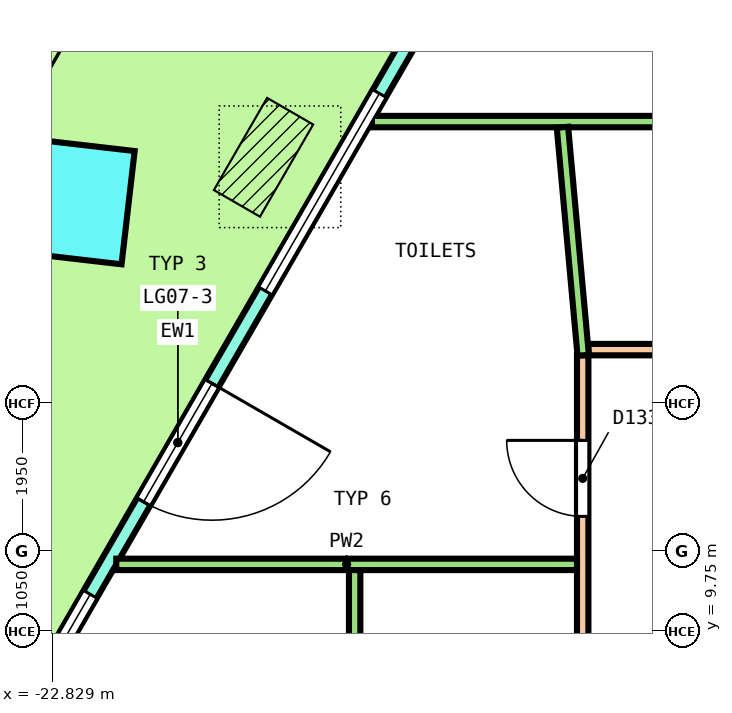
"""IFC4 building model, lengths in metres.
Left out: names, types, materials, properties, quantities, classifications, styles, units other than length and angle.
Written with IfcOpenShell. Run it as: python <this file> out.ifc"""

import sys

from ifc_helpers import new_model, si_unit, direction, frame, frame_2d, origin, origin_2d, place, context, subcontext, project, spatial, polyline, rectangle, outline, extrude, element, fill, save


model = new_model("IFC4")
c1 = context("Model", 3, precision=1e-05, world=origin(), true_north=direction((0.0, 1.0)))
c2 = subcontext(c1, "Body", "Model", "MODEL_VIEW")
j1 = project(units=[si_unit("LENGTHUNIT", "METRE"), si_unit("PLANEANGLEUNIT", "RADIAN")], contexts=[c1])
p1 = place(None, origin())
s1 = spatial("IfcSite", under=j1, at=p1, CompositionType="ELEMENT")
p2 = place(p1, origin())
s2 = spatial("IfcBuilding", under=s1, at=p2, CompositionType="ELEMENT")
p3 = place(p2, frame((0.0, 0.0, 32.2)))
s3 = spatial("IfcBuildingStorey", under=s2, at=p3, CompositionType="ELEMENT", Elevation=32.2)
p4 = place(p3, frame((-22.576, 15.404, 0.0), z_axis=(-0.029040860623, 0.012532155622, 0.999499661576), x_axis=(-0.499041572146, -0.866570424295, -0.003634419767)))
e1 = element("IfcColumn", 1, at=p4, inside=s3, PredefinedType="COLUMN", context=c2, shape_type="SweptSolid", body=[
    extrude(rectangle(XDim=1.5, YDim=1.5, at=origin_2d()), origin(), (0.0, 0.0, 1.0), 4.052),
])
p5 = place(p3, frame((-16.422, 20.463, 0.0), z_axis=(0.0, 0.0, 1.0), x_axis=(-0.500001707189, -0.866024418136, 0.0)))
e2 = element("IfcWall", 2, at=p5, inside=s3, PredefinedType="SOLIDWALL", context=c2, shape_type="SweptSolid", body=[
    extrude(outline(polyline([(-0.027, -0.1), (0.977, -0.1), (1.981, -0.1), (2.985, -0.1), (3.989, -0.1), (4.993, -0.1), (5.997, -0.1), (7.0, -0.1), (8.004, -0.1), (9.008, -0.1), (10.012, -0.1), (11.016, -0.1), (12.02, -0.1), (13.024, -0.1), (14.028, -0.1), (15.032, -0.1), (16.036, -0.1), (17.04, -0.1), (18.043, -0.1), (19.047, -0.1), (18.994, 0.1), (17.995, 0.1), (16.997, 0.1), (15.999, 0.1), (15.001, 0.1), (14.002, 0.1), (13.004, 0.1), (12.006, 0.1), (11.008, 0.1), (10.009, 0.1), (9.011, 0.1), (8.013, 0.1), (7.015, 0.1), (6.016, 0.1), (5.018, 0.1), (4.02, 0.1), (3.022, 0.1), (2.023, 0.1), (1.025, 0.1), (0.027, 0.1), (-0.027, -0.1)])), origin(), (0.0, 0.0, 1.0), 4.1),
])
p6 = place(p5, frame((0.402, 0.0, 0.1)))
e3 = element("IfcOpeningElement", 3, at=p6, cuts=e2, PredefinedType="OPENING", context=c2, shape_type="SweptSolid", body=[
    extrude(rectangle(XDim=3.0, YDim=2.9, at=frame_2d((1.5, 1.45))), frame((0.0, 0.11, 0.0), z_axis=(0.0, -1.0, 0.0), x_axis=(1.0, 0.0, 0.0)), (0.0, 0.0, 1.0), 0.22),
])
p7 = place(p5, frame((4.206, 0.0, 0.1)))
e4 = element("IfcOpeningElement", 4, at=p7, cuts=e2, PredefinedType="OPENING", context=c2, shape_type="SweptSolid", body=[
    extrude(rectangle(XDim=3.0, YDim=2.9, at=frame_2d((1.5, 1.45))), frame((0.0, 0.11, 0.0), z_axis=(0.0, -1.0, 0.0), x_axis=(1.0, 0.0, 0.0)), (0.0, 0.0, 1.0), 0.22),
])
p8 = place(p5, frame((8.61, 0.0, 0.0)))
e5 = element("IfcOpeningElement", 5, at=p8, cuts=e2, PredefinedType="OPENING", context=c2, shape_type="SweptSolid", body=[
    extrude(rectangle(XDim=1.8, YDim=2.4, at=frame_2d((0.9, 1.2))), frame((0.0, 0.11, 0.0), z_axis=(0.0, -1.0, 0.0), x_axis=(1.0, 0.0, 0.0)), (0.0, 0.0, 1.0), 0.22),
])
p9 = place(p5, frame((8.61, 0.0, 2.55)))
e6 = element("IfcOpeningElement", 6, at=p9, cuts=e2, PredefinedType="OPENING", context=c2, shape_type="SweptSolid", body=[
    extrude(rectangle(XDim=1.8, YDim=0.45, at=frame_2d((0.9, 0.225))), frame((0.0, 0.11, 0.0), z_axis=(0.0, -1.0, 0.0), x_axis=(1.0, 0.0, 0.0)), (0.0, 0.0, 1.0), 0.22),
])
p10 = place(p5, frame((11.814, 0.0, 0.1)))
e7 = element("IfcOpeningElement", 7, at=p10, cuts=e2, PredefinedType="OPENING", context=c2, shape_type="SweptSolid", body=[
    extrude(rectangle(XDim=3.0, YDim=2.9, at=frame_2d((1.5, 1.45))), frame((0.0, 0.11, 0.0), z_axis=(0.0, -1.0, 0.0), x_axis=(1.0, 0.0, 0.0)), (0.0, 0.0, 1.0), 0.22),
])
p11 = place(p5, frame((15.618, 0.0, 0.1)))
e8 = element("IfcOpeningElement", 8, at=p11, cuts=e2, PredefinedType="OPENING", context=c2, shape_type="SweptSolid", body=[
    extrude(rectangle(XDim=3.0, YDim=2.9, at=frame_2d((1.5, 1.45))), frame((0.0, 0.11, 0.0), z_axis=(0.0, -1.0, 0.0), x_axis=(1.0, 0.0, 0.0)), (0.0, 0.0, 1.0), 0.22),
])
p12 = place(p3, frame((-15.775, 13.45, 0.0), z_axis=(0.0, 0.0, 1.0), x_axis=(1.0, 0.0, 0.0)))
e9 = element("IfcWall", 9, at=p12, inside=s3, PredefinedType="PARTITIONING", context=c2, shape_type="SweptSolid", body=[
    extrude(rectangle(XDim=31.575, YDim=0.15, at=frame_2d((15.788, 0.0))), origin(), (0.0, 0.0, 1.0), 3.05),
])
p13 = place(p12, frame((28.448, 0.0, 0.0)))
e10 = element("IfcOpeningElement", 10, at=p13, cuts=e9, PredefinedType="OPENING", context=c2, shape_type="SweptSolid", body=[
    extrude(rectangle(XDim=1.0, YDim=2.1, at=frame_2d((0.5, 1.05))), frame((0.0, 0.085, 0.0), z_axis=(0.0, -1.0, 0.0), x_axis=(1.0, 0.0, 0.0)), (0.0, 0.0, 1.0), 0.17),
])
p14 = place(p12, frame((24.146, 0.0, 0.0)))
e11 = element("IfcOpeningElement", 11, at=p14, cuts=e9, PredefinedType="OPENING", context=c2, shape_type="SweptSolid", body=[
    extrude(rectangle(XDim=1.2, YDim=2.1, at=frame_2d((0.6, 1.05))), frame((0.0, 0.085, 0.0), z_axis=(0.0, -1.0, 0.0), x_axis=(1.0, 0.0, 0.0)), (0.0, 0.0, 1.0), 0.17),
])
p15 = place(p12, frame((18.378, 0.0, 0.0)))
e12 = element("IfcOpeningElement", 12, at=p15, cuts=e9, PredefinedType="OPENING", context=c2, shape_type="SweptSolid", body=[
    extrude(rectangle(XDim=1.0, YDim=2.1, at=frame_2d((0.5, 1.05))), frame((0.0, 0.085, 0.0), z_axis=(0.0, -1.0, 0.0), x_axis=(1.0, 0.0, 0.0)), (0.0, 0.0, 1.0), 0.17),
])
p16 = place(p12, frame((3.288, 0.0, 0.0)))
e13 = element("IfcOpeningElement", 13, at=p16, cuts=e9, PredefinedType="OPENING", context=c2, shape_type="SweptSolid", body=[
    extrude(rectangle(XDim=1.0, YDim=2.1, at=frame_2d((0.5, 1.05))), frame((0.0, 0.085, 0.0), z_axis=(0.0, -1.0, 0.0), x_axis=(1.0, 0.0, 0.0)), (0.0, 0.0, 1.0), 0.17),
])
p17 = place(p3, frame((-15.85, -13.375, 0.0), z_axis=(0.0, 0.0, 1.0), x_axis=(0.0, 1.0, 0.0)))
e14 = element("IfcWall", 14, at=p17, inside=s3, PredefinedType="PARTITIONING", context=c2, shape_type="SweptSolid", body=[
    extrude(rectangle(XDim=26.75, YDim=0.15, at=frame_2d((13.375, 0.0))), origin(), (0.0, 0.0, 1.0), 3.05),
])
p18 = place(p17, frame((24.631, 0.0, 0.0)))
e15 = element("IfcOpeningElement", 15, at=p18, cuts=e14, PredefinedType="OPENING", context=c2, shape_type="SweptSolid", body=[
    extrude(rectangle(XDim=1.0, YDim=2.1, at=frame_2d((0.5, 1.05))), frame((0.0, 0.085, 0.0), z_axis=(0.0, -1.0, 0.0), x_axis=(1.0, 0.0, 0.0)), (0.0, 0.0, 1.0), 0.17),
])
p19 = place(p17, frame((16.371, 0.0, 0.0)))
e16 = element("IfcOpeningElement", 16, at=p19, cuts=e14, PredefinedType="OPENING", context=c2, shape_type="SweptSolid", body=[
    extrude(rectangle(XDim=1.0, YDim=2.1, at=frame_2d((0.5, 1.05))), frame((0.0, 0.085, 0.0), z_axis=(0.0, -1.0, 0.0), x_axis=(1.0, 0.0, 0.0)), (0.0, 0.0, 1.0), 0.17),
])
p20 = place(p17, frame((6.705, 0.0, 0.0)))
e17 = element("IfcOpeningElement", 17, at=p20, cuts=e14, PredefinedType="OPENING", context=c2, shape_type="SweptSolid", body=[
    extrude(rectangle(XDim=1.0, YDim=2.1, at=frame_2d((0.5, 1.05))), frame((0.0, 0.085, 0.0), z_axis=(0.0, -1.0, 0.0), x_axis=(1.0, 0.0, 0.0)), (0.0, 0.0, 1.0), 0.17),
])
p21 = place(p3, frame((-21.986, 10.625, 0.0), z_axis=(0.0, 0.0, 1.0), x_axis=(1.0, 0.0, 0.0)))
e18 = element("IfcWall", 18, at=p21, inside=s3, PredefinedType="PARTITIONING", context=c2, shape_type="SweptSolid", body=[
    extrude(rectangle(XDim=6.061, YDim=0.15, at=frame_2d((3.031, 0.0))), origin(), (0.0, 0.0, 1.0), 3.05),
])
p22 = place(p3, frame((-18.623, 16.45, 0.0), z_axis=(0.0, 0.0, 1.0), x_axis=(1.0, 0.0, 0.0)))
e19 = element("IfcWall", 19, at=p22, inside=s3, PredefinedType="PARTITIONING", context=c2, shape_type="SweptSolid", body=[
    extrude(rectangle(XDim=16.449, YDim=0.15, at=frame_2d((8.225, 0.0))), origin(), (0.0, 0.0, 1.0), 3.05),
])
p23 = place(p3, frame((-16.116, 16.375, 0.0), z_axis=(0.0, 0.0, 1.0), x_axis=(0.09060881957, -0.995886560717, 0.0)))
e20 = element("IfcWall", 20, at=p23, inside=s3, PredefinedType="PARTITIONING", context=c2, shape_type="SweptSolid", body=[
    extrude(rectangle(XDim=3.012, YDim=0.15, at=frame_2d((1.506, 0.0))), origin(), (0.0, 0.0, 1.0), 3.05),
])
p24 = place(p3, frame((-18.85, -10.107, 0.0), z_axis=(0.0, 0.0, 1.0), x_axis=(0.0, 1.0, 0.0)))
e21 = element("IfcWall", 21, at=p24, inside=s3, PredefinedType="PARTITIONING", context=c2, shape_type="SweptSolid", body=[
    extrude(rectangle(XDim=20.657, YDim=0.15, at=frame_2d((10.329, 0.0))), origin(), (0.0, 0.0, 1.0), 3.05),
])
p25 = place(p24, frame((17.139, 0.0, 0.0)))
e22 = element("IfcOpeningElement", 22, at=p25, cuts=e21, PredefinedType="OPENING", context=c2, shape_type="SweptSolid", body=[
    extrude(rectangle(XDim=1.2, YDim=2.1, at=frame_2d((0.6, 1.05))), frame((0.0, 0.085, 0.0), z_axis=(0.0, -1.0, 0.0), x_axis=(1.0, 0.0, 0.0)), (0.0, 0.0, 1.0), 0.17),
])
p26 = place(p7, origin())
e23 = element("IfcWindow", 23, at=p26, inside=s3, PartitioningType="SINGLE_PANEL", PredefinedType="WINDOW", context=c2, shape_type="SweptSolid", body=[
    extrude(rectangle(XDim=3.0, YDim=2.9, at=frame_2d((1.5, 1.45))), frame((0.0, 0.03, 0.0), z_axis=(0.0, -1.0, 0.0), x_axis=(1.0, 0.0, 0.0)), (0.0, 0.0, 1.0), 0.06),
])
fill(e4, e23)
p27 = place(p8, origin())
e24 = element("IfcDoor", 24, at=p27, inside=s3, OperationType="DOUBLE_DOOR_SINGLE_SWING", PredefinedType="DOOR", context=c2, shape_type="SweptSolid", body=[
    extrude(rectangle(XDim=1.8, YDim=2.4, at=frame_2d((0.9, 1.2))), frame((0.0, 0.025, 0.0), z_axis=(0.0, -1.0, 0.0), x_axis=(1.0, 0.0, 0.0)), (0.0, 0.0, 1.0), 0.05),
])
fill(e5, e24)
p28 = place(p9, origin())
e25 = element("IfcWindow", 25, at=p28, inside=s3, PartitioningType="SINGLE_PANEL", PredefinedType="WINDOW", context=c2, shape_type="SweptSolid", body=[
    extrude(rectangle(XDim=1.8, YDim=0.45, at=frame_2d((0.9, 0.225))), frame((0.0, 0.03, 0.0), z_axis=(0.0, -1.0, 0.0), x_axis=(1.0, 0.0, 0.0)), (0.0, 0.0, 1.0), 0.06),
])
fill(e6, e25)
p29 = place(p10, origin())
e26 = element("IfcWindow", 26, at=p29, inside=s3, PartitioningType="SINGLE_PANEL", PredefinedType="WINDOW", context=c2, shape_type="SweptSolid", body=[
    extrude(rectangle(XDim=3.0, YDim=2.9, at=frame_2d((1.5, 1.45))), frame((0.0, 0.03, 0.0), z_axis=(0.0, -1.0, 0.0), x_axis=(1.0, 0.0, 0.0)), (0.0, 0.0, 1.0), 0.06),
])
fill(e7, e26)
p30 = place(p18, origin())
e27 = element("IfcDoor", 27, at=p30, inside=s3, OperationType="SINGLE_SWING_LEFT", PredefinedType="DOOR", context=c2, shape_type="SweptSolid", body=[
    extrude(rectangle(XDim=1.0, YDim=2.1, at=frame_2d((0.5, 1.05))), frame((0.0, 0.025, 0.0), z_axis=(0.0, -1.0, 0.0), x_axis=(1.0, 0.0, 0.0)), (0.0, 0.0, 1.0), 0.05),
])
fill(e15, e27)
save(model, sys.argv[1])
